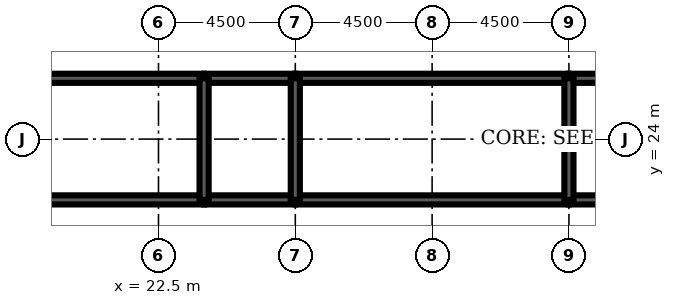
"""IFC4 building model, lengths in metres.
Left out: names, types, materials, properties, quantities, classifications, styles, units other than length and angle.
Written with IfcOpenShell. Run it as: python <this file> out.ifc"""

import sys

from ifc_helpers import new_model, si_unit, direction, frame, frame_2d, origin, place, context, subcontext, project, spatial, rectangle, extrude, element, fill, save


model = new_model("IFC4")
c1 = context("Model", 3, precision=1e-05, world=origin(), true_north=direction((0.0, 1.0)))
c2 = subcontext(c1, "Body", "Model", "MODEL_VIEW")
j1 = project(units=[si_unit("LENGTHUNIT", "METRE"), si_unit("PLANEANGLEUNIT", "RADIAN")], contexts=[c1])
p1 = place(None, origin())
s1 = spatial("IfcSite", under=j1, at=p1, CompositionType="ELEMENT")
p2 = place(p1, origin())
s2 = spatial("IfcBuilding", under=s1, at=p2, CompositionType="ELEMENT")
p3 = place(p2, frame((0.0, 0.0, 283.7)))
s3 = spatial("IfcBuildingStorey", under=s2, at=p3, CompositionType="ELEMENT", Elevation=283.7)
p4 = place(p3, frame((18.0, 22.0, 0.0), z_axis=(0.0, 0.0, 1.0), x_axis=(1.0, 0.0, 0.0)))
e1 = element("IfcWall", 1, at=p4, inside=s3, PredefinedType="SOLIDWALL", context=c2, shape_type="SweptSolid", body=[
    extrude(rectangle(XDim=6.0, YDim=0.3, at=frame_2d((3.0, 0.0))), origin(), (0.0, 0.0, 1.0), 4.2),
])
p5 = place(p4, frame((4.4, 0.0, 0.0)))
e2 = element("IfcOpeningElement", 2, at=p5, cuts=e1, PredefinedType="OPENING", context=c2, shape_type="SweptSolid", body=[
    extrude(rectangle(XDim=1.0, YDim=2.1, at=frame_2d((0.5, 1.05))), frame((0.0, 0.16, 0.0), z_axis=(0.0, -1.0, 0.0), x_axis=(1.0, 0.0, 0.0)), (0.0, 0.0, 1.0), 0.32),
])
p6 = place(p4, frame((0.6, 0.0, 0.0)))
e3 = element("IfcOpeningElement", 3, at=p6, cuts=e1, PredefinedType="OPENING", context=c2, shape_type="SweptSolid", body=[
    extrude(rectangle(XDim=1.0, YDim=2.1, at=frame_2d((0.5, 1.05))), frame((0.0, 0.16, 0.0), z_axis=(0.0, -1.0, 0.0), x_axis=(1.0, 0.0, 0.0)), (0.0, 0.0, 1.0), 0.32),
])
p7 = place(p3, frame((24.0, 22.0, 0.0), z_axis=(0.0, 0.0, 1.0), x_axis=(1.0, 0.0, 0.0)))
e4 = element("IfcWall", 4, at=p7, inside=s3, PredefinedType="SOLIDWALL", context=c2, shape_type="SweptSolid", body=[
    extrude(rectangle(XDim=3.0, YDim=0.3, at=frame_2d((1.5, 0.0))), origin(), (0.0, 0.0, 1.0), 4.2),
])
p8 = place(p7, frame((1.0, 0.0, 0.0)))
e5 = element("IfcOpeningElement", 5, at=p8, cuts=e4, PredefinedType="OPENING", context=c2, shape_type="SweptSolid", body=[
    extrude(rectangle(XDim=1.0, YDim=2.1, at=frame_2d((0.5, 1.05))), frame((0.0, 0.16, 0.0), z_axis=(0.0, -1.0, 0.0), x_axis=(1.0, 0.0, 0.0)), (0.0, 0.0, 1.0), 0.32),
])
p9 = place(p3, frame((27.0, 22.0, 0.0), z_axis=(0.0, 0.0, 1.0), x_axis=(1.0, 0.0, 0.0)))
e6 = element("IfcWall", 6, at=p9, inside=s3, PredefinedType="SOLIDWALL", context=c2, shape_type="SweptSolid", body=[
    extrude(rectangle(XDim=9.0, YDim=0.3, at=frame_2d((4.5, 0.0))), origin(), (0.0, 0.0, 1.0), 4.2),
])
p10 = place(p9, frame((4.0, 0.0, 0.0)))
e7 = element("IfcOpeningElement", 7, at=p10, cuts=e6, PredefinedType="OPENING", context=c2, shape_type="SweptSolid", body=[
    extrude(rectangle(XDim=1.0, YDim=2.1, at=frame_2d((0.5, 1.05))), frame((0.0, 0.16, 0.0), z_axis=(0.0, -1.0, 0.0), x_axis=(1.0, 0.0, 0.0)), (0.0, 0.0, 1.0), 0.32),
])
p11 = place(p3, frame((36.0, 22.0, 0.0), z_axis=(0.0, 0.0, 1.0), x_axis=(1.0, 0.0, 0.0)))
e8 = element("IfcWall", 8, at=p11, inside=s3, PredefinedType="SOLIDWALL", context=c2, shape_type="SweptSolid", body=[
    extrude(rectangle(XDim=9.0, YDim=0.3, at=frame_2d((4.5, 0.0))), origin(), (0.0, 0.0, 1.0), 4.2),
])
p12 = place(p11, frame((4.0, 0.0, 0.0)))
e9 = element("IfcOpeningElement", 9, at=p12, cuts=e8, PredefinedType="OPENING", context=c2, shape_type="SweptSolid", body=[
    extrude(rectangle(XDim=1.0, YDim=2.1, at=frame_2d((0.5, 1.05))), frame((0.0, 0.16, 0.0), z_axis=(0.0, -1.0, 0.0), x_axis=(1.0, 0.0, 0.0)), (0.0, 0.0, 1.0), 0.32),
])
p13 = place(p3, frame((18.0, 26.0, 0.0), z_axis=(0.0, 0.0, 1.0), x_axis=(1.0, 0.0, 0.0)))
e10 = element("IfcWall", 10, at=p13, inside=s3, PredefinedType="SOLIDWALL", context=c2, shape_type="SweptSolid", body=[
    extrude(rectangle(XDim=6.0, YDim=0.3, at=frame_2d((3.0, 0.0))), origin(), (0.0, 0.0, 1.0), 4.2),
])
p14 = place(p3, frame((24.0, 26.0, 0.0), z_axis=(0.0, 0.0, 1.0), x_axis=(1.0, 0.0, 0.0)))
e11 = element("IfcWall", 11, at=p14, inside=s3, PredefinedType="SOLIDWALL", context=c2, shape_type="SweptSolid", body=[
    extrude(rectangle(XDim=3.0, YDim=0.3, at=frame_2d((1.5, 0.0))), origin(), (0.0, 0.0, 1.0), 4.2),
])
for number, where, z_axis, x_axis in (
    (12, (27.0, 26.0, 0.0), (0.0, 0.0, 1.0), (1.0, 0.0, 0.0)),
    (13, (36.0, 26.0, 0.0), (0.0, 0.0, 1.0), (1.0, 0.0, 0.0)),
):
    element("IfcWall", number, at=place(p3, frame(where, z_axis=z_axis, x_axis=x_axis)), inside=s3, PredefinedType="SOLIDWALL", context=c2, shape_type="SweptSolid", body=[
        extrude(rectangle(XDim=9.0, YDim=0.3, at=frame_2d((4.5, 0.0))), origin(), (0.0, 0.0, 1.0), 4.2),
    ])
for number, where, z_axis, x_axis in (
    (14, (24.0, 22.0, 0.0), (0.0, 0.0, 1.0), (0.0, 1.0, 0.0)),
    (15, (27.0, 22.0, 0.0), (0.0, 0.0, 1.0), (0.0, 1.0, 0.0)),
    (16, (36.0, 22.0, 0.0), (0.0, 0.0, 1.0), (0.0, 1.0, 0.0)),
):
    element("IfcWall", number, at=place(p3, frame(where, z_axis=z_axis, x_axis=x_axis)), inside=s3, PredefinedType="SOLIDWALL", context=c2, shape_type="SweptSolid", body=[
        extrude(rectangle(XDim=4.0, YDim=0.3, at=frame_2d((2.0, 0.0))), origin(), (0.0, 0.0, 1.0), 4.2),
    ])
p15 = place(p3, frame((19.925, 22.15, 0.0), z_axis=(0.0, 0.0, 1.0), x_axis=(0.0, 1.0, 0.0)))
e17 = element("IfcWall", 17, at=p15, inside=s3, PredefinedType="PARTITIONING", context=c2, shape_type="SweptSolid", body=[
    extrude(rectangle(XDim=3.7, YDim=0.15, at=frame_2d((1.85, 0.0))), origin(), (0.0, 0.0, 1.0), 3.0),
])
p16 = place(p5, origin())
e18 = element("IfcDoor", 18, at=p16, inside=s3, OperationType="SINGLE_SWING_RIGHT", PredefinedType="DOOR", context=c2, shape_type="SweptSolid", body=[
    extrude(rectangle(XDim=1.0, YDim=2.1, at=frame_2d((0.5, 1.05))), frame((0.0, 0.025, 0.0), z_axis=(0.0, -1.0, 0.0), x_axis=(1.0, 0.0, 0.0)), (0.0, 0.0, 1.0), 0.05),
])
fill(e2, e18)
p17 = place(p8, origin())
e19 = element("IfcDoor", 19, at=p17, inside=s3, OperationType="SINGLE_SWING_LEFT", PredefinedType="DOOR", context=c2, shape_type="SweptSolid", body=[
    extrude(rectangle(XDim=1.0, YDim=2.1, at=frame_2d((0.5, 1.05))), frame((0.0, 0.025, 0.0), z_axis=(0.0, -1.0, 0.0), x_axis=(1.0, 0.0, 0.0)), (0.0, 0.0, 1.0), 0.05),
])
fill(e5, e19)
p18 = place(p10, origin())
e20 = element("IfcDoor", 20, at=p18, inside=s3, OperationType="SINGLE_SWING_LEFT", PredefinedType="DOOR", context=c2, shape_type="SweptSolid", body=[
    extrude(rectangle(XDim=1.0, YDim=2.1, at=frame_2d((0.5, 1.05))), frame((0.0, 0.025, 0.0), z_axis=(0.0, -1.0, 0.0), x_axis=(1.0, 0.0, 0.0)), (0.0, 0.0, 1.0), 0.05),
])
fill(e7, e20)
p19 = place(p6, origin())
e21 = element("IfcDoor", 21, at=p19, inside=s3, OperationType="SINGLE_SWING_LEFT", PredefinedType="DOOR", context=c2, shape_type="SweptSolid", body=[
    extrude(rectangle(XDim=1.0, YDim=2.1, at=frame_2d((0.5, 1.05))), frame((0.0, 0.025, 0.0), z_axis=(0.0, -1.0, 0.0), x_axis=(1.0, 0.0, 0.0)), (0.0, 0.0, 1.0), 0.05),
])
fill(e3, e21)
save(model, sys.argv[1])
